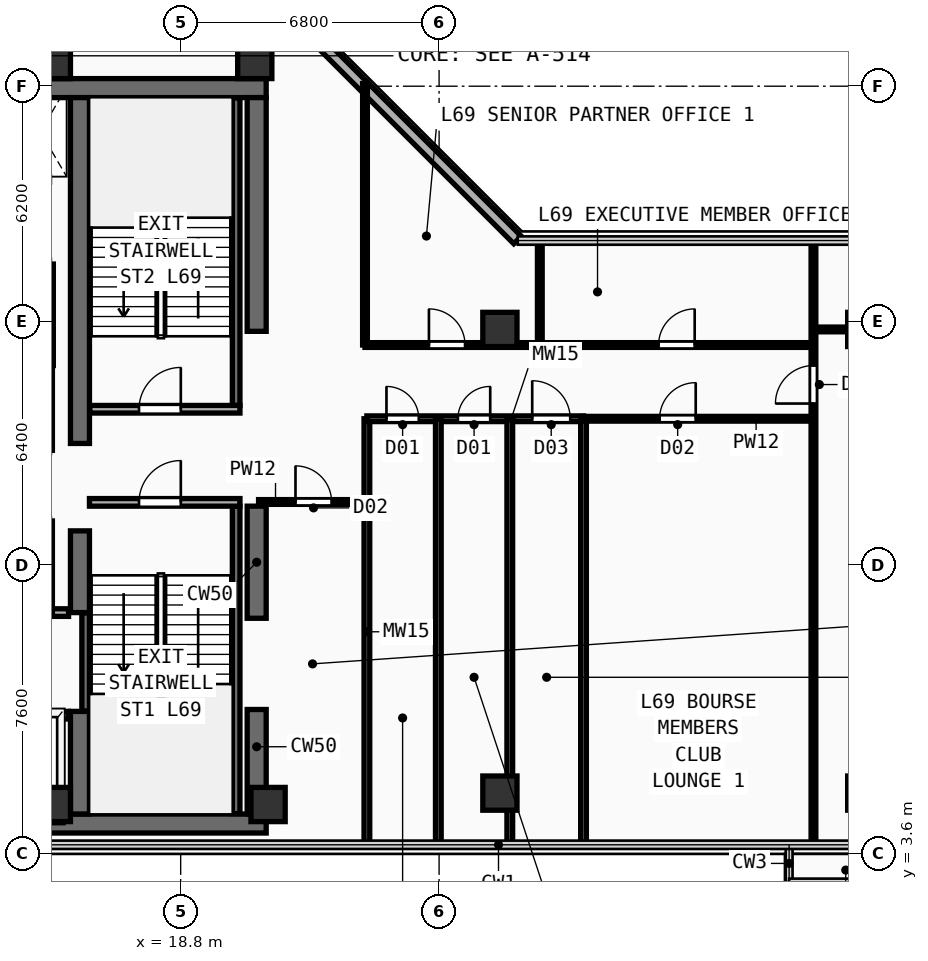
"""IFC4 building model, lengths in metres.
Left out: names, types, materials, properties, quantities, classifications, styles, units other than length and angle.
Written with IfcOpenShell. Run it as: python <this file> out.ifc"""

import sys

from ifc_helpers import new_model, si_unit, direction, frame, frame_2d, origin, origin_2d, place, context, subcontext, project, spatial, rectangle, extrude, element, fill, save


model = new_model("IFC4")
c1 = context("Model", 3, precision=1e-05, world=origin(), true_north=direction((0.0, 1.0)))
c2 = subcontext(c1, "Body", "Model", "MODEL_VIEW")
j1 = project(units=[si_unit("LENGTHUNIT", "METRE"), si_unit("PLANEANGLEUNIT", "RADIAN")], contexts=[c1])
p1 = place(None, origin())
s1 = spatial("IfcSite", under=j1, at=p1, CompositionType="ELEMENT")
p2 = place(p1, origin())
s2 = spatial("IfcBuilding", under=s1, at=p2, CompositionType="ELEMENT")
p3 = place(p2, frame((0.0, 0.0, 270.4)))
s3 = spatial("IfcBuildingStorey", under=s2, at=p3, CompositionType="ELEMENT", Elevation=270.4)
for number, where, z_axis, x_axis in (
    (1, (7.2, 4.4, 0.0), (0.0, 0.0, 1.0), (1.0, 0.0, 0.0)),
    (2, (7.2, 23.75, 0.0), (0.0, 0.0, 1.0), (1.0, 0.0, 0.0)),
):
    element("IfcWall", number, at=place(p3, frame(where, z_axis=z_axis, x_axis=x_axis)), inside=s3, PredefinedType="SHEAR", context=c2, shape_type="SweptSolid", body=[
        extrude(rectangle(XDim=13.85, YDim=0.5, at=frame_2d((6.925, 0.0))), origin(), (0.0, 0.0, 1.0), 3.56),
    ])
p4 = place(p3, frame((20.8, 4.65, 0.0), z_axis=(0.0, 0.0, 1.0), x_axis=(0.0, 1.0, 0.0)))
e3 = element("IfcWall", 3, at=p4, inside=s3, PredefinedType="SHEAR", context=c2, shape_type="SweptSolid", body=[
    extrude(rectangle(XDim=2.75, YDim=0.5, at=frame_2d((1.375, 0.0))), origin(), (0.0, 0.0, 1.0), 3.56),
])
p5 = place(p3, frame((20.8, 9.8, 0.0), z_axis=(0.0, 0.0, 1.0), x_axis=(0.0, 1.0, 0.0)))
e4 = element("IfcWall", 4, at=p5, inside=s3, PredefinedType="SHEAR", context=c2, shape_type="SweptSolid", body=[
    extrude(rectangle(XDim=2.95, YDim=0.5, at=frame_2d((1.475, 0.0))), origin(), (0.0, 0.0, 1.0), 3.56),
])
p6 = place(p3, frame((20.8, 17.35, 0.0), z_axis=(0.0, 0.0, 1.0), x_axis=(0.0, 1.0, 0.0)))
e5 = element("IfcWall", 5, at=p6, inside=s3, PredefinedType="SHEAR", context=c2, shape_type="SweptSolid", body=[
    extrude(rectangle(XDim=6.15, YDim=0.5, at=frame_2d((3.075, 0.0))), origin(), (0.0, 0.0, 1.0), 3.56),
])
p7 = place(p3, frame((16.15, 4.65, 0.0), z_axis=(0.0, 0.0, 1.0), x_axis=(0.0, 1.0, 0.0)))
e6 = element("IfcWall", 6, at=p7, inside=s3, PredefinedType="SHEAR", context=c2, shape_type="SweptSolid", body=[
    extrude(rectangle(XDim=2.7, YDim=0.5, at=frame_2d((1.35, 0.0))), origin(), (0.0, 0.0, 1.0), 3.56),
])
p8 = place(p3, frame((16.15, 9.95, 0.0), z_axis=(0.0, 0.0, 1.0), x_axis=(0.0, 1.0, 0.0)))
e7 = element("IfcWall", 7, at=p8, inside=s3, PredefinedType="SHEAR", context=c2, shape_type="SweptSolid", body=[
    extrude(rectangle(XDim=2.15, YDim=0.5, at=frame_2d((1.075, 0.0))), origin(), (0.0, 0.0, 1.0), 3.56),
])
p9 = place(p3, frame((16.15, 14.4, 0.0), z_axis=(0.0, 0.0, 1.0), x_axis=(0.0, 1.0, 0.0)))
e8 = element("IfcWall", 8, at=p9, inside=s3, PredefinedType="SHEAR", context=c2, shape_type="SweptSolid", body=[
    extrude(rectangle(XDim=9.1, YDim=0.5, at=frame_2d((4.55, 0.0))), origin(), (0.0, 0.0, 1.0), 3.56),
])
for number, where, z_axis, x_axis in (
    (9, (15.45, 4.9, 0.0), (0.0, 0.0, 1.0), (1.0, 0.0, 0.0)),
    (10, (21.1, 4.9, 0.0), (0.0, 0.0, 1.0), (1.0, 0.0, 0.0)),
    (11, (15.45, 24.45, 0.0), (0.0, 0.0, 1.0), (1.0, 0.0, 0.0)),
    (12, (20.75, 24.45, 0.0), (0.0, 0.0, 1.0), (1.0, 0.0, 0.0)),
    (13, (27.2, 5.2, 0.0), (0.0, 0.0, 1.0), (1.0, 0.0, 0.0)),
    (14, (36.8, 5.2, 0.0), (0.0, 0.0, 1.0), (1.0, 0.0, 0.0)),
    (15, (27.2, 17.4, 0.0), (0.0, 0.0, 1.0), (1.0, 0.0, 0.0)),
    (16, (36.8, 17.4, 0.0), (0.0, 0.0, 1.0), (1.0, 0.0, 0.0)),
):
    element("IfcColumn", number, at=place(p3, frame(where, z_axis=z_axis, x_axis=x_axis)), inside=s3, PredefinedType="COLUMN", context=c2, shape_type="SweptSolid", body=[
        extrude(rectangle(XDim=0.9, YDim=0.9, at=origin_2d()), origin(), (0.0, 0.0, 1.0), 3.56),
    ])
p10 = place(p3, frame((27.664, 19.754, 0.0), z_axis=(0.0, 0.0, 1.0), x_axis=(-0.707106781187, 0.707106781187, 0.0)))
e17 = element("IfcWall", 17, at=p10, inside=s3, PredefinedType="SOLIDWALL", context=c2, shape_type="SweptSolid", body=[
    extrude(rectangle(XDim=9.207, YDim=0.28, at=frame_2d((4.603, 0.0))), origin(), (0.0, 0.0, 1.0), 3.56),
])
p11 = place(p3, frame((16.3, 7.36, 0.0), z_axis=(0.0, 0.0, 1.0), x_axis=(0.0, 1.0, 0.0)))
e18 = element("IfcWall", 18, at=p11, inside=s3, PredefinedType="SHEAR", context=c2, shape_type="SweptSolid", body=[
    extrude(rectangle(XDim=2.58, YDim=0.2, at=frame_2d((1.29, 0.0))), origin(), (0.0, 0.0, 1.0), 3.56),
])
p12 = place(p3, frame((20.26, 4.66, 0.0), z_axis=(0.0, 0.0, 1.0), x_axis=(0.0, 1.0, 0.0)))
e19 = element("IfcWall", 19, at=p12, inside=s3, PredefinedType="SHEAR", context=c2, shape_type="SweptSolid", body=[
    extrude(rectangle(XDim=8.09, YDim=0.2, at=frame_2d((4.045, 0.0))), origin(), (0.0, 0.0, 1.0), 3.56),
])
p13 = place(p3, frame((16.4, 12.85, 0.0), z_axis=(0.0, 0.0, 1.0), x_axis=(1.0, 0.0, 0.0)))
e20 = element("IfcWall", 20, at=p13, inside=s3, PredefinedType="PARTITIONING", context=c2, shape_type="SweptSolid", body=[
    extrude(rectangle(XDim=3.96, YDim=0.2, at=frame_2d((1.98, 0.0))), origin(), (0.0, 0.0, 1.0), 3.56),
])
p14 = place(p13, frame((1.304, 0.0, 0.0)))
e21 = element("IfcOpeningElement", 21, at=p14, cuts=e20, PredefinedType="OPENING", context=c2, shape_type="SweptSolid", body=[
    extrude(rectangle(XDim=1.1, YDim=2.2, at=frame_2d((0.55, 1.1))), frame((0.0, 0.11, 0.0), z_axis=(0.0, -1.0, 0.0), x_axis=(1.0, 0.0, 0.0)), (0.0, 0.0, 1.0), 0.22),
])
p15 = place(p3, frame((20.26, 15.4, 0.0), z_axis=(0.0, 0.0, 1.0), x_axis=(0.0, 1.0, 0.0)))
e22 = element("IfcWall", 22, at=p15, inside=s3, PredefinedType="SHEAR", context=c2, shape_type="SweptSolid", body=[
    extrude(rectangle(XDim=8.09, YDim=0.2, at=frame_2d((4.045, 0.0))), origin(), (0.0, 0.0, 1.0), 3.56),
])
p16 = place(p3, frame((16.41, 15.3, 0.0), z_axis=(0.0, 0.0, 1.0), x_axis=(1.0, 0.0, 0.0)))
e23 = element("IfcWall", 23, at=p16, inside=s3, PredefinedType="PARTITIONING", context=c2, shape_type="SweptSolid", body=[
    extrude(rectangle(XDim=3.95, YDim=0.2, at=frame_2d((1.975, 0.0))), origin(), (0.0, 0.0, 1.0), 3.56),
])
p17 = place(p16, frame((1.294, 0.0, 0.0)))
e24 = element("IfcOpeningElement", 24, at=p17, cuts=e23, PredefinedType="OPENING", context=c2, shape_type="SweptSolid", body=[
    extrude(rectangle(XDim=1.1, YDim=2.2, at=frame_2d((0.55, 1.1))), frame((0.0, 0.11, 0.0), z_axis=(0.0, -1.0, 0.0), x_axis=(1.0, 0.0, 0.0)), (0.0, 0.0, 1.0), 0.22),
])
p18 = place(p3, frame((7.5, 7.25, 0.0), z_axis=(0.0, 0.0, 1.0), x_axis=(1.0, 0.0, 0.0)))
e25 = element("IfcWall", 25, at=p18, inside=s3, PredefinedType="PARTITIONING", context=c2, shape_type="SweptSolid", body=[
    extrude(rectangle(XDim=8.35, YDim=0.2, at=frame_2d((4.175, 0.0))), origin(), (0.0, 0.0, 1.0), 3.56),
])
p19 = place(p18, frame((0.53, 0.0, 0.0)))
e26 = element("IfcOpeningElement", 26, at=p19, cuts=e25, PredefinedType="OPENING", context=c2, shape_type="SweptSolid", body=[
    extrude(rectangle(XDim=1.1, YDim=2.2, at=frame_2d((0.55, 1.1))), frame((0.0, 0.11, 0.0), z_axis=(0.0, -1.0, 0.0), x_axis=(1.0, 0.0, 0.0)), (0.0, 0.0, 1.0), 0.22),
])
p20 = place(p18, frame((2.37, 0.0, 0.0)))
e27 = element("IfcOpeningElement", 27, at=p20, cuts=e25, PredefinedType="OPENING", context=c2, shape_type="SweptSolid", body=[
    extrude(rectangle(XDim=1.1, YDim=2.2, at=frame_2d((0.55, 1.1))), frame((0.0, 0.11, 0.0), z_axis=(0.0, -1.0, 0.0), x_axis=(1.0, 0.0, 0.0)), (0.0, 0.0, 1.0), 0.22),
])
p21 = place(p18, frame((4.33, 0.0, 0.0)))
e28 = element("IfcOpeningElement", 28, at=p21, cuts=e25, PredefinedType="OPENING", context=c2, shape_type="SweptSolid", body=[
    extrude(rectangle(XDim=1.1, YDim=2.2, at=frame_2d((0.55, 1.1))), frame((0.0, 0.11, 0.0), z_axis=(0.0, -1.0, 0.0), x_axis=(1.0, 0.0, 0.0)), (0.0, 0.0, 1.0), 0.22),
])
p22 = place(p18, frame((6.5, 0.0, 0.0)))
e29 = element("IfcOpeningElement", 29, at=p22, cuts=e25, PredefinedType="OPENING", context=c2, shape_type="SweptSolid", body=[
    extrude(rectangle(XDim=1.1, YDim=2.2, at=frame_2d((0.55, 1.1))), frame((0.0, 0.11, 0.0), z_axis=(0.0, -1.0, 0.0), x_axis=(1.0, 0.0, 0.0)), (0.0, 0.0, 1.0), 0.22),
])
p23 = place(p3, frame((7.5, 9.95, 0.0), z_axis=(0.0, 0.0, 1.0), x_axis=(1.0, 0.0, 0.0)))
e30 = element("IfcWall", 30, at=p23, inside=s3, PredefinedType="PARTITIONING", context=c2, shape_type="SweptSolid", body=[
    extrude(rectangle(XDim=8.35, YDim=0.2, at=frame_2d((4.175, 0.0))), origin(), (0.0, 0.0, 1.0), 3.56),
])
p24 = place(p3, frame((15.35, 9.95, 0.0), z_axis=(0.0, 0.0, 1.0), x_axis=(0.0, 1.0, 0.0)))
e31 = element("IfcWall", 31, at=p24, inside=s3, PredefinedType="PARTITIONING", context=c2, shape_type="SweptSolid", body=[
    extrude(rectangle(XDim=2.41, YDim=0.15, at=frame_2d((1.205, 0.0))), origin(), (0.0, 0.0, 1.0), 3.56),
])
p25 = place(p3, frame((15.35, 14.22, 0.0), z_axis=(0.0, 0.0, 1.0), x_axis=(0.0, 1.0, 0.0)))
e32 = element("IfcWall", 32, at=p25, inside=s3, PredefinedType="PARTITIONING", context=c2, shape_type="SweptSolid", body=[
    extrude(rectangle(XDim=2.23, YDim=0.15, at=frame_2d((1.115, 0.0))), origin(), (0.0, 0.0, 1.0), 3.56),
])
p26 = place(p3, frame((15.35, 16.45, 0.0), z_axis=(0.0, 0.0, 1.0), x_axis=(0.0, 1.0, 0.0)))
e33 = element("IfcWall", 33, at=p26, inside=s3, PredefinedType="PARTITIONING", context=c2, shape_type="SweptSolid", body=[
    extrude(rectangle(XDim=2.67, YDim=0.2, at=frame_2d((1.335, 0.0))), origin(), (0.0, 0.0, 1.0), 3.56),
])
p27 = place(p3, frame((23.7, 3.84, 0.0), z_axis=(0.0, 0.0, 1.0), x_axis=(0.0, 1.0, 0.0)))
e34 = element("IfcWall", 34, at=p27, inside=s3, PredefinedType="PLUMBINGWALL", context=c2, shape_type="SweptSolid", body=[
    extrude(rectangle(XDim=11.21, YDim=0.15, at=frame_2d((5.605, 0.0))), origin(), (0.0, 0.0, 1.0), 3.56),
])
p28 = place(p3, frame((23.7, 15.05, 0.0), z_axis=(0.0, 0.0, 1.0), x_axis=(1.0, 0.0, 0.0)))
e35 = element("IfcWall", 35, at=p28, inside=s3, PredefinedType="PLUMBINGWALL", context=c2, shape_type="SweptSolid", body=[
    extrude(rectangle(XDim=5.7, YDim=0.15, at=frame_2d((2.85, 0.0))), origin(), (0.0, 0.0, 1.0), 3.56),
])
p29 = place(p28, frame((0.515, 0.0, 0.0)))
e36 = element("IfcOpeningElement", 36, at=p29, cuts=e35, PredefinedType="OPENING", context=c2, shape_type="SweptSolid", body=[
    extrude(rectangle(XDim=0.85, YDim=2.15, at=frame_2d((0.425, 1.075))), frame((0.0, 0.085, 0.0), z_axis=(0.0, -1.0, 0.0), x_axis=(1.0, 0.0, 0.0)), (0.0, 0.0, 1.0), 0.17),
])
p30 = place(p28, frame((2.395, 0.0, 0.0)))
e37 = element("IfcOpeningElement", 37, at=p30, cuts=e35, PredefinedType="OPENING", context=c2, shape_type="SweptSolid", body=[
    extrude(rectangle(XDim=0.85, YDim=2.15, at=frame_2d((0.425, 1.075))), frame((0.0, 0.085, 0.0), z_axis=(0.0, -1.0, 0.0), x_axis=(1.0, 0.0, 0.0)), (0.0, 0.0, 1.0), 0.17),
])
p31 = place(p28, frame((4.35, 0.0, 0.0)))
e38 = element("IfcOpeningElement", 38, at=p31, cuts=e35, PredefinedType="OPENING", context=c2, shape_type="SweptSolid", body=[
    extrude(rectangle(XDim=1.0, YDim=2.2, at=frame_2d((0.5, 1.1))), frame((0.0, 0.085, 0.0), z_axis=(0.0, -1.0, 0.0), x_axis=(1.0, 0.0, 0.0)), (0.0, 0.0, 1.0), 0.17),
])
p32 = place(p3, frame((25.58, 3.84, 0.0), z_axis=(0.0, 0.0, 1.0), x_axis=(0.0, 1.0, 0.0)))
e39 = element("IfcWall", 39, at=p32, inside=s3, PredefinedType="PLUMBINGWALL", context=c2, shape_type="SweptSolid", body=[
    extrude(rectangle(XDim=11.21, YDim=0.15, at=frame_2d((5.605, 0.0))), origin(), (0.0, 0.0, 1.0), 3.56),
])
p33 = place(p3, frame((27.46, 3.84, 0.0), z_axis=(0.0, 0.0, 1.0), x_axis=(0.0, 1.0, 0.0)))
e40 = element("IfcWall", 40, at=p33, inside=s3, PredefinedType="PLUMBINGWALL", context=c2, shape_type="SweptSolid", body=[
    extrude(rectangle(XDim=11.21, YDim=0.15, at=frame_2d((5.605, 0.0))), origin(), (0.0, 0.0, 1.0), 2.798),
])
p34 = place(p3, frame((29.4, 3.84, 0.0), z_axis=(0.0, 0.0, 1.0), x_axis=(0.0, 1.0, 0.0)))
e41 = element("IfcWall", 41, at=p34, inside=s3, PredefinedType="PLUMBINGWALL", context=c2, shape_type="SweptSolid", body=[
    extrude(rectangle(XDim=11.21, YDim=0.15, at=frame_2d((5.605, 0.0))), origin(), (0.0, 0.0, 1.0), 3.56),
])
p35 = place(p3, frame((20.85, 12.86, 0.0), z_axis=(0.0, 0.0, 1.0), x_axis=(1.0, 0.0, 0.0)))
e42 = element("IfcWall", 42, at=p35, inside=s3, PredefinedType="PARTITIONING", context=c2, shape_type="SweptSolid", body=[
    extrude(rectangle(XDim=2.85, YDim=0.125, at=frame_2d((1.425, 0.0))), origin(), (0.0, 0.0, 1.0), 3.56),
])
p36 = place(p35, frame((0.971, 0.0, 0.0)))
e43 = element("IfcOpeningElement", 43, at=p36, cuts=e42, PredefinedType="OPENING", context=c2, shape_type="SweptSolid", body=[
    extrude(rectangle(XDim=0.95, YDim=2.15, at=frame_2d((0.475, 1.075))), frame((0.0, 0.073, 0.0), z_axis=(0.0, -1.0, 0.0), x_axis=(1.0, 0.0, 0.0)), (0.0, 0.0, 1.0), 0.145),
])
p37 = place(p3, frame((29.4, 15.05, 0.0), z_axis=(0.0, 0.0, 1.0), x_axis=(1.0, 0.0, 0.0)))
e44 = element("IfcWall", 44, at=p37, inside=s3, PredefinedType="PARTITIONING", context=c2, shape_type="SweptSolid", body=[
    extrude(rectangle(XDim=6.05, YDim=0.125, at=frame_2d((3.025, 0.0))), origin(), (0.0, 0.0, 1.0), 3.56),
])
p38 = place(p37, frame((2.002, 0.0, 0.0)))
e45 = element("IfcOpeningElement", 45, at=p38, cuts=e44, PredefinedType="OPENING", context=c2, shape_type="SweptSolid", body=[
    extrude(rectangle(XDim=0.95, YDim=2.15, at=frame_2d((0.475, 1.075))), frame((0.0, 0.073, 0.0), z_axis=(0.0, -1.0, 0.0), x_axis=(1.0, 0.0, 0.0)), (0.0, 0.0, 1.0), 0.145),
])
p39 = place(p3, frame((35.45, 3.84, 0.0), z_axis=(0.0, 0.0, 1.0), x_axis=(0.0, 1.0, 0.0)))
e46 = element("IfcWall", 46, at=p39, inside=s3, PredefinedType="PARTITIONING", context=c2, shape_type="SweptSolid", body=[
    extrude(rectangle(XDim=15.92, YDim=0.125, at=frame_2d((7.96, 0.0))), origin(), (0.0, 0.0, 1.0), 3.56),
])
p40 = place(p39, frame((11.61, 0.0, 0.0)))
e47 = element("IfcOpeningElement", 47, at=p40, cuts=e46, PredefinedType="OPENING", context=c2, shape_type="SweptSolid", body=[
    extrude(rectangle(XDim=1.0, YDim=2.2, at=frame_2d((0.5, 1.1))), frame((0.0, 0.073, 0.0), z_axis=(0.0, -1.0, 0.0), x_axis=(1.0, 0.0, 0.0)), (0.0, 0.0, 1.0), 0.145),
])
p41 = place(p3, frame((35.45, 17.4, 0.0), z_axis=(0.0, 0.0, 1.0), x_axis=(1.0, 0.0, 0.0)))
e48 = element("IfcWall", 48, at=p41, inside=s3, PredefinedType="PARTITIONING", context=c2, shape_type="SweptSolid", body=[
    extrude(rectangle(XDim=15.563, YDim=0.125, at=frame_2d((7.781, 0.0))), origin(), (0.0, 0.0, 1.0), 3.2),
])
p42 = place(p41, frame((2.95, 0.0, 0.0)))
e49 = element("IfcOpeningElement", 49, at=p42, cuts=e48, PredefinedType="OPENING", context=c2, shape_type="SweptSolid", body=[
    extrude(rectangle(XDim=0.95, YDim=2.15, at=frame_2d((0.475, 1.075))), frame((0.0, 0.073, 0.0), z_axis=(0.0, -1.0, 0.0), x_axis=(1.0, 0.0, 0.0)), (0.0, 0.0, 1.0), 0.145),
])
p43 = place(p3, frame((23.65, 16.99, 0.0), z_axis=(0.0, 0.0, 1.0), x_axis=(0.0, 1.0, 0.0)))
e50 = element("IfcWall", 50, at=p43, inside=s3, PredefinedType="PARTITIONING", context=c2, shape_type="SweptSolid", body=[
    extrude(rectangle(XDim=6.878, YDim=0.125, at=frame_2d((3.439, 0.0))), origin(), (0.0, 0.0, 1.0), 3.56),
])
p44 = place(p3, frame((23.65, 16.99, 0.0), z_axis=(0.0, 0.0, 1.0), x_axis=(1.0, 0.0, 0.0)))
e51 = element("IfcWall", 51, at=p44, inside=s3, PredefinedType="PARTITIONING", context=c2, shape_type="SweptSolid", body=[
    extrude(rectangle(XDim=11.8, YDim=0.125, at=frame_2d((5.9, 0.0))), origin(), (0.0, 0.0, 1.0), 3.56),
])
p45 = place(p44, frame((1.683, 0.0, 0.0)))
e52 = element("IfcOpeningElement", 52, at=p45, cuts=e51, PredefinedType="OPENING", context=c2, shape_type="SweptSolid", body=[
    extrude(rectangle(XDim=0.95, YDim=2.15, at=frame_2d((0.475, 1.075))), frame((0.0, 0.073, 0.0), z_axis=(0.0, -1.0, 0.0), x_axis=(1.0, 0.0, 0.0)), (0.0, 0.0, 1.0), 0.145),
])
p46 = place(p44, frame((7.725, 0.0, 0.0)))
e53 = element("IfcOpeningElement", 53, at=p46, cuts=e51, PredefinedType="OPENING", context=c2, shape_type="SweptSolid", body=[
    extrude(rectangle(XDim=0.95, YDim=2.15, at=frame_2d((0.475, 1.075))), frame((0.0, 0.073, 0.0), z_axis=(0.0, -1.0, 0.0), x_axis=(1.0, 0.0, 0.0)), (0.0, 0.0, 1.0), 0.145),
])
p47 = place(p3, frame((28.25, 16.99, 0.0), z_axis=(0.0, 0.0, 1.0), x_axis=(0.0, 1.0, 0.0)))
e54 = element("IfcWall", 54, at=p47, inside=s3, PredefinedType="PARTITIONING", context=c2, shape_type="SweptSolid", body=[
    extrude(rectangle(XDim=2.77, YDim=0.125, at=frame_2d((1.385, 0.0))), origin(), (0.0, 0.0, 1.0), 3.56),
])
p48 = place(p14, frame((1.1, 0.0, 0.0), z_axis=(0.0, 0.0, 1.0), x_axis=(-1.0, 0.0, 0.0)))
e55 = element("IfcDoor", 55, at=p48, inside=s3, OperationType="SINGLE_SWING_LEFT", PredefinedType="DOOR", context=c2, shape_type="SweptSolid", body=[
    extrude(rectangle(XDim=1.1, YDim=2.2, at=frame_2d((0.55, 1.1))), frame((0.0, 0.025, 0.0), z_axis=(0.0, -1.0, 0.0), x_axis=(1.0, 0.0, 0.0)), (0.0, 0.0, 1.0), 0.05),
])
fill(e21, e55)
p49 = place(p17, origin())
e56 = element("IfcDoor", 56, at=p49, inside=s3, OperationType="SINGLE_SWING_RIGHT", PredefinedType="DOOR", context=c2, shape_type="SweptSolid", body=[
    extrude(rectangle(XDim=1.1, YDim=2.2, at=frame_2d((0.55, 1.1))), frame((0.0, 0.025, 0.0), z_axis=(0.0, -1.0, 0.0), x_axis=(1.0, 0.0, 0.0)), (0.0, 0.0, 1.0), 0.05),
])
fill(e24, e56)
p50 = place(p29, origin())
e57 = element("IfcDoor", 57, at=p50, inside=s3, OperationType="SINGLE_SWING_LEFT", PredefinedType="DOOR", context=c2, shape_type="SweptSolid", body=[
    extrude(rectangle(XDim=0.85, YDim=2.15, at=frame_2d((0.425, 1.075))), frame((0.0, 0.025, 0.0), z_axis=(0.0, -1.0, 0.0), x_axis=(1.0, 0.0, 0.0)), (0.0, 0.0, 1.0), 0.05),
])
fill(e36, e57)
p51 = place(p30, origin())
e58 = element("IfcDoor", 58, at=p51, inside=s3, OperationType="SINGLE_SWING_RIGHT", PredefinedType="DOOR", context=c2, shape_type="SweptSolid", body=[
    extrude(rectangle(XDim=0.85, YDim=2.15, at=frame_2d((0.425, 1.075))), frame((0.0, 0.025, 0.0), z_axis=(0.0, -1.0, 0.0), x_axis=(1.0, 0.0, 0.0)), (0.0, 0.0, 1.0), 0.05),
])
fill(e37, e58)
p52 = place(p31, origin())
e59 = element("IfcDoor", 59, at=p52, inside=s3, OperationType="SINGLE_SWING_LEFT", PredefinedType="DOOR", context=c2, shape_type="SweptSolid", body=[
    extrude(rectangle(XDim=1.0, YDim=2.2, at=frame_2d((0.5, 1.1))), frame((0.0, 0.025, 0.0), z_axis=(0.0, -1.0, 0.0), x_axis=(1.0, 0.0, 0.0)), (0.0, 0.0, 1.0), 0.05),
])
fill(e38, e59)
p53 = place(p36, origin())
e60 = element("IfcDoor", 60, at=p53, inside=s3, OperationType="SINGLE_SWING_LEFT", PredefinedType="DOOR", context=c2, shape_type="SweptSolid", body=[
    extrude(rectangle(XDim=0.95, YDim=2.15, at=frame_2d((0.475, 1.075))), frame((0.0, 0.025, 0.0), z_axis=(0.0, -1.0, 0.0), x_axis=(1.0, 0.0, 0.0)), (0.0, 0.0, 1.0), 0.05),
])
fill(e43, e60)
p54 = place(p38, origin())
e61 = element("IfcDoor", 61, at=p54, inside=s3, OperationType="SINGLE_SWING_RIGHT", PredefinedType="DOOR", context=c2, shape_type="SweptSolid", body=[
    extrude(rectangle(XDim=0.95, YDim=2.15, at=frame_2d((0.475, 1.075))), frame((0.0, 0.025, 0.0), z_axis=(0.0, -1.0, 0.0), x_axis=(1.0, 0.0, 0.0)), (0.0, 0.0, 1.0), 0.05),
])
fill(e45, e61)
p55 = place(p40, origin())
e62 = element("IfcDoor", 62, at=p55, inside=s3, OperationType="SINGLE_SWING_LEFT", PredefinedType="DOOR", context=c2, shape_type="SweptSolid", body=[
    extrude(rectangle(XDim=1.0, YDim=2.2, at=frame_2d((0.5, 1.1))), frame((0.0, 0.025, 0.0), z_axis=(0.0, -1.0, 0.0), x_axis=(1.0, 0.0, 0.0)), (0.0, 0.0, 1.0), 0.05),
])
fill(e47, e62)
p56 = place(p45, origin())
e63 = element("IfcDoor", 63, at=p56, inside=s3, OperationType="SINGLE_SWING_LEFT", PredefinedType="DOOR", context=c2, shape_type="SweptSolid", body=[
    extrude(rectangle(XDim=0.95, YDim=2.15, at=frame_2d((0.475, 1.075))), frame((0.0, 0.025, 0.0), z_axis=(0.0, -1.0, 0.0), x_axis=(1.0, 0.0, 0.0)), (0.0, 0.0, 1.0), 0.05),
])
fill(e52, e63)
p57 = place(p46, origin())
e64 = element("IfcDoor", 64, at=p57, inside=s3, OperationType="SINGLE_SWING_RIGHT", PredefinedType="DOOR", context=c2, shape_type="SweptSolid", body=[
    extrude(rectangle(XDim=0.95, YDim=2.15, at=frame_2d((0.475, 1.075))), frame((0.0, 0.025, 0.0), z_axis=(0.0, -1.0, 0.0), x_axis=(1.0, 0.0, 0.0)), (0.0, 0.0, 1.0), 0.05),
])
fill(e53, e64)
save(model, sys.argv[1])
